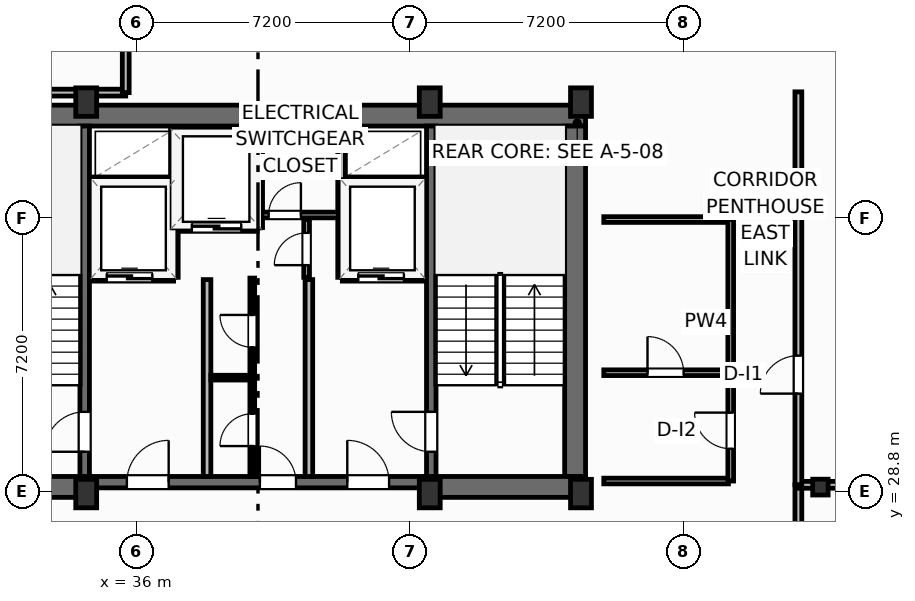
"""IFC4 building model, lengths in metres.
Left out: names, types, materials, properties, quantities, classifications, styles, units other than length and angle.
Written with IfcOpenShell. Run it as: python <this file> out.ifc"""

import sys

from ifc_helpers import new_model, si_unit, direction, frame, frame_2d, origin, origin_2d, place, context, subcontext, project, spatial, rectangle, i_section, extrude, element, fill, save


model = new_model("IFC4")
c1 = context("Model", 3, precision=1e-05, world=origin(), true_north=direction((0.0, 1.0)))
c2 = subcontext(c1, "Body", "Model", "MODEL_VIEW")
j1 = project(units=[si_unit("LENGTHUNIT", "METRE"), si_unit("PLANEANGLEUNIT", "RADIAN")], contexts=[c1])
p1 = place(None, origin())
s1 = spatial("IfcSite", under=j1, at=p1, CompositionType="ELEMENT")
p2 = place(p1, origin())
s2 = spatial("IfcBuilding", under=s1, at=p2, CompositionType="ELEMENT")
p3 = place(p2, frame((0.0, 0.0, 287.8)))
s3 = spatial("IfcBuildingStorey", under=s2, at=p3, CompositionType="ELEMENT", Elevation=287.8)
for number, where, z_axis, x_axis in (
    (1, (34.68, 28.75, 0.0), (0.0, 0.0, 1.0), (1.0, 0.0, 0.0)),
    (2, (43.72, 28.75, 0.0), (0.0, 0.0, 1.0), (1.0, 0.0, 0.0)),
    (3, (47.7, 28.75, 0.0), (0.0, 0.0, 1.0), (1.0, 0.0, 0.0)),
    (4, (34.68, 39.05, 0.0), (0.0, 0.0, 1.0), (1.0, 0.0, 0.0)),
    (5, (43.72, 39.05, 0.0), (0.0, 0.0, 1.0), (1.0, 0.0, 0.0)),
    (6, (47.7, 39.05, 0.0), (0.0, 0.0, 1.0), (1.0, 0.0, 0.0)),
):
    element("IfcColumn", number, at=place(p3, frame(where, z_axis=z_axis, x_axis=x_axis)), inside=s3, PredefinedType="COLUMN", context=c2, shape_type="SweptSolid", body=[
        extrude(rectangle(XDim=0.55, YDim=0.75, at=origin_2d()), origin(), (0.0, 0.0, 1.0), 3.7),
    ])
p4 = place(p3, frame((54.0, 28.92, 0.0), z_axis=(0.0, 0.0, 1.0), x_axis=(1.0, 0.0, 0.0)))
e7 = element("IfcColumn", 7, at=p4, inside=s3, PredefinedType="COLUMN", context=c2, shape_type="SweptSolid", body=[
    extrude(i_section(OverallWidth=0.406, OverallDepth=0.416, WebThickness=0.03, FlangeThickness=0.048, FilletRadius=0.025, at=origin_2d()), origin(), (0.0, 0.0, 1.0), 3.7),
])
p5 = place(p3, frame((30.58, 38.695, 0.0), z_axis=(0.0, 0.0, 1.0), x_axis=(1.0, 0.0, 0.0)))
e8 = element("IfcWall", 8, at=p5, inside=s3, PredefinedType="SHEAR", context=c2, shape_type="SweptSolid", body=[
    extrude(rectangle(XDim=17.24, YDim=0.55, at=frame_2d((8.62, 0.0))), origin(), (0.0, 0.0, 1.0), 3.38),
])
p6 = place(p3, frame((47.545, 29.2, 0.0), z_axis=(0.0, 0.0, 1.0), x_axis=(0.0, 1.0, 0.0)))
e9 = element("IfcWall", 9, at=p6, inside=s3, PredefinedType="SHEAR", context=c2, shape_type="SweptSolid", body=[
    extrude(rectangle(XDim=9.22, YDim=0.55, at=frame_2d((4.61, 0.0))), origin(), (0.0, 0.0, 1.0), 3.38),
])
for number, where, z_axis, x_axis in (
    (10, (30.58, 28.925, 0.0), (0.0, 0.0, 1.0), (1.0, 0.0, 0.0)),
    (11, (43.6, 28.925, 0.0), (0.0, 0.0, 1.0), (1.0, 0.0, 0.0)),
):
    element("IfcWall", number, at=place(p3, frame(where, z_axis=z_axis, x_axis=x_axis)), inside=s3, PredefinedType="SHEAR", context=c2, shape_type="SweptSolid", body=[
        extrude(rectangle(XDim=4.22, YDim=0.55, at=frame_2d((2.11, 0.0))), origin(), (0.0, 0.0, 1.0), 3.38),
    ])
p7 = place(p3, frame((34.8, 29.05, 0.0), z_axis=(0.0, 0.0, 1.0), x_axis=(1.0, 0.0, 0.0)))
e12 = element("IfcWall", 12, at=p7, inside=s3, PredefinedType="SHEAR", context=c2, shape_type="SweptSolid", body=[
    extrude(rectangle(XDim=8.8, YDim=0.3, at=frame_2d((4.4, 0.0))), origin(), (0.0, 0.0, 1.0), 3.38),
])
p8 = place(p7, frame((0.95, 0.0, 0.0)))
e13 = element("IfcOpeningElement", 13, at=p8, cuts=e12, PredefinedType="OPENING", context=c2, shape_type="SweptSolid", body=[
    extrude(rectangle(XDim=1.1, YDim=2.15, at=frame_2d((0.55, 1.075))), frame((0.0, 0.16, 0.0), z_axis=(0.0, -1.0, 0.0), x_axis=(1.0, 0.0, 0.0)), (0.0, 0.0, 1.0), 0.32),
])
p9 = place(p7, frame((6.75, 0.0, 0.0)))
e14 = element("IfcOpeningElement", 14, at=p9, cuts=e12, PredefinedType="OPENING", context=c2, shape_type="SweptSolid", body=[
    extrude(rectangle(XDim=1.1, YDim=2.15, at=frame_2d((0.55, 1.075))), frame((0.0, 0.16, 0.0), z_axis=(0.0, -1.0, 0.0), x_axis=(1.0, 0.0, 0.0)), (0.0, 0.0, 1.0), 0.32),
])
p10 = place(p7, frame((4.45, 0.0, 0.0)))
e15 = element("IfcOpeningElement", 15, at=p10, cuts=e12, PredefinedType="OPENING", context=c2, shape_type="SweptSolid", body=[
    extrude(rectangle(XDim=0.95, YDim=2.15, at=frame_2d((0.475, 1.075))), frame((0.0, 0.16, 0.0), z_axis=(0.0, -1.0, 0.0), x_axis=(1.0, 0.0, 0.0)), (0.0, 0.0, 1.0), 0.32),
])
p11 = place(p3, frame((34.64, 29.2, 0.0), z_axis=(0.0, 0.0, 1.0), x_axis=(0.0, 1.0, 0.0)))
e16 = element("IfcWall", 16, at=p11, inside=s3, PredefinedType="SHEAR", context=c2, shape_type="SweptSolid", body=[
    extrude(rectangle(XDim=9.22, YDim=0.25, at=frame_2d((4.61, 0.0))), origin(), (0.0, 0.0, 1.0), 3.38),
])
p12 = place(p11, frame((0.65, 0.0, 0.0)))
e17 = element("IfcOpeningElement", 17, at=p12, cuts=e16, PredefinedType="OPENING", context=c2, shape_type="SweptSolid", body=[
    extrude(rectangle(XDim=1.05, YDim=2.15, at=frame_2d((0.525, 1.075))), frame((0.0, 0.135, 0.0), z_axis=(0.0, -1.0, 0.0), x_axis=(1.0, 0.0, 0.0)), (0.0, 0.0, 1.0), 0.27),
])
p13 = place(p3, frame((43.76, 29.2, 0.0), z_axis=(0.0, 0.0, 1.0), x_axis=(0.0, 1.0, 0.0)))
e18 = element("IfcWall", 18, at=p13, inside=s3, PredefinedType="SHEAR", context=c2, shape_type="SweptSolid", body=[
    extrude(rectangle(XDim=9.22, YDim=0.25, at=frame_2d((4.61, 0.0))), origin(), (0.0, 0.0, 1.0), 3.38),
])
p14 = place(p13, frame((0.65, 0.0, 0.0)))
e19 = element("IfcOpeningElement", 19, at=p14, cuts=e18, PredefinedType="OPENING", context=c2, shape_type="SweptSolid", body=[
    extrude(rectangle(XDim=1.05, YDim=2.15, at=frame_2d((0.525, 1.075))), frame((0.0, 0.135, 0.0), z_axis=(0.0, -1.0, 0.0), x_axis=(1.0, 0.0, 0.0)), (0.0, 0.0, 1.0), 0.27),
])
p15 = place(p3, frame((53.42, 19.3, 0.0), z_axis=(0.0, 0.0, 1.0), x_axis=(0.0, 1.0, 0.0)))
e20 = element("IfcWall", 20, at=p15, inside=s3, PredefinedType="PARTITIONING", context=c2, shape_type="SweptSolid", body=[
    extrude(rectangle(XDim=9.68, YDim=0.18, at=frame_2d((4.84, 0.0))), origin(), (0.0, 0.0, 1.0), 3.38),
])
p16 = place(p15, frame((7.4, 0.0, 0.0)))
e21 = element("IfcOpeningElement", 21, at=p16, cuts=e20, PredefinedType="OPENING", context=c2, shape_type="SweptSolid", body=[
    extrude(rectangle(XDim=1.0, YDim=2.05, at=frame_2d((0.5, 1.025))), frame((0.0, 0.1, 0.0), z_axis=(0.0, -1.0, 0.0), x_axis=(1.0, 0.0, 0.0)), (0.0, 0.0, 1.0), 0.2),
])
p17 = place(p3, frame((53.42, 28.98, 0.0), z_axis=(0.0, 0.0, 1.0), x_axis=(1.0, 0.0, 0.0)))
e22 = element("IfcWall", 22, at=p17, inside=s3, PredefinedType="PARTITIONING", context=c2, shape_type="SweptSolid", body=[
    extrude(rectangle(XDim=16.58, YDim=0.18, at=frame_2d((8.29, 0.0))), origin(), (0.0, 0.0, 1.0), 2.592),
])
p18 = place(p3, frame((53.42, 28.98, 0.0), z_axis=(0.0, 0.0, 1.0), x_axis=(0.0, 1.0, 0.0)))
e23 = element("IfcWall", 23, at=p18, inside=s3, PredefinedType="PARTITIONING", context=c2, shape_type="SweptSolid", body=[
    extrude(rectangle(XDim=10.34, YDim=0.18, at=frame_2d((5.17, 0.0))), origin(), (0.0, 0.0, 1.0), 3.38),
])
p19 = place(p18, frame((2.4, 0.0, 0.0)))
e24 = element("IfcOpeningElement", 24, at=p19, cuts=e23, PredefinedType="OPENING", context=c2, shape_type="SweptSolid", body=[
    extrude(rectangle(XDim=1.0, YDim=2.05, at=frame_2d((0.5, 1.025))), frame((0.0, 0.1, 0.0), z_axis=(0.0, -1.0, 0.0), x_axis=(1.0, 0.0, 0.0)), (0.0, 0.0, 1.0), 0.2),
])
p20 = place(p3, frame((27.159, 39.3, 0.0), z_axis=(0.0, 0.0, 1.0), x_axis=(1.0, 0.0, 0.0)))
e25 = element("IfcWall", 25, at=p20, inside=s3, PredefinedType="PARTITIONING", context=c2, shape_type="SweptSolid", body=[
    extrude(rectangle(XDim=8.561, YDim=0.18, at=frame_2d((4.281, 0.0))), origin(), (0.0, 0.0, 1.0), 3.38),
])
p21 = place(p3, frame((35.72, 39.3, 0.0), z_axis=(0.0, 0.0, 1.0), x_axis=(0.0, 1.0, 0.0)))
e26 = element("IfcWall", 26, at=p21, inside=s3, PredefinedType="PARTITIONING", context=c2, shape_type="SweptSolid", body=[
    extrude(rectangle(XDim=2.12, YDim=0.18, at=frame_2d((1.06, 0.0))), origin(), (0.0, 0.0, 1.0), 3.38),
])
for number, where, z_axis, x_axis in (
    (27, (37.86, 29.2, 0.0), (0.0, 0.0, 1.0), (0.0, 1.0, 0.0)),
    (28, (40.54, 29.2, 0.0), (0.0, 0.0, 1.0), (0.0, 1.0, 0.0)),
):
    element("IfcWall", number, at=place(p3, frame(where, z_axis=z_axis, x_axis=x_axis)), inside=s3, PredefinedType="PARTITIONING", context=c2, shape_type="SweptSolid", body=[
        extrude(rectangle(XDim=5.18, YDim=0.2, at=frame_2d((2.59, 0.0))), origin(), (0.0, 0.0, 1.0), 3.38),
    ])
p22 = place(p3, frame((34.8, 34.44, 0.0), z_axis=(0.0, 0.0, 1.0), x_axis=(1.0, 0.0, 0.0)))
e29 = element("IfcWall", 29, at=p22, inside=s3, PredefinedType="PARTITIONING", context=c2, shape_type="SweptSolid", body=[
    extrude(rectangle(XDim=2.18, YDim=0.2, at=frame_2d((1.09, 0.0))), origin(), (0.0, 0.0, 1.0), 3.38),
])
p23 = place(p22, frame((0.42, 0.0, 0.0)))
e30 = element("IfcOpeningElement", 30, at=p23, cuts=e29, PredefinedType="OPENING", context=c2, shape_type="SweptSolid", body=[
    extrude(rectangle(XDim=1.2, YDim=2.2, at=frame_2d((0.6, 1.1))), frame((0.0, 0.11, 0.0), z_axis=(0.0, -1.0, 0.0), x_axis=(1.0, 0.0, 0.0)), (0.0, 0.0, 1.0), 0.22),
])
p24 = place(p3, frame((34.8, 36.98, 0.0), z_axis=(0.0, 0.0, 1.0), x_axis=(1.0, 0.0, 0.0)))
e31 = element("IfcWall", 31, at=p24, inside=s3, PredefinedType="PARTITIONING", context=c2, shape_type="SweptSolid", body=[
    extrude(rectangle(XDim=2.18, YDim=0.2, at=frame_2d((1.09, 0.0))), origin(), (0.0, 0.0, 1.0), 3.38),
])
p25 = place(p3, frame((37.0, 34.44, 0.0), z_axis=(0.0, 0.0, 1.0), x_axis=(0.0, 1.0, 0.0)))
e32 = element("IfcWall", 32, at=p25, inside=s3, PredefinedType="PARTITIONING", context=c2, shape_type="SweptSolid", body=[
    extrude(rectangle(XDim=3.9, YDim=0.2, at=frame_2d((1.95, 0.0))), origin(), (0.0, 0.0, 1.0), 3.38),
])
p26 = place(p3, frame((41.42, 34.44, 0.0), z_axis=(0.0, 0.0, 1.0), x_axis=(1.0, 0.0, 0.0)))
e33 = element("IfcWall", 33, at=p26, inside=s3, PredefinedType="PARTITIONING", context=c2, shape_type="SweptSolid", body=[
    extrude(rectangle(XDim=2.18, YDim=0.2, at=frame_2d((1.09, 0.0))), origin(), (0.0, 0.0, 1.0), 3.38),
])
p27 = place(p26, frame((0.42, 0.0, 0.0)))
e34 = element("IfcOpeningElement", 34, at=p27, cuts=e33, PredefinedType="OPENING", context=c2, shape_type="SweptSolid", body=[
    extrude(rectangle(XDim=1.2, YDim=2.2, at=frame_2d((0.6, 1.1))), frame((0.0, 0.11, 0.0), z_axis=(0.0, -1.0, 0.0), x_axis=(1.0, 0.0, 0.0)), (0.0, 0.0, 1.0), 0.22),
])
p28 = place(p3, frame((41.42, 36.98, 0.0), z_axis=(0.0, 0.0, 1.0), x_axis=(1.0, 0.0, 0.0)))
e35 = element("IfcWall", 35, at=p28, inside=s3, PredefinedType="PARTITIONING", context=c2, shape_type="SweptSolid", body=[
    extrude(rectangle(XDim=2.18, YDim=0.2, at=frame_2d((1.09, 0.0))), origin(), (0.0, 0.0, 1.0), 3.38),
])
p29 = place(p3, frame((41.4, 34.44, 0.0), z_axis=(0.0, 0.0, 1.0), x_axis=(0.0, 1.0, 0.0)))
e36 = element("IfcWall", 36, at=p29, inside=s3, PredefinedType="PARTITIONING", context=c2, shape_type="SweptSolid", body=[
    extrude(rectangle(XDim=3.9, YDim=0.2, at=frame_2d((1.95, 0.0))), origin(), (0.0, 0.0, 1.0), 3.38),
])
p30 = place(p3, frame((37.06, 35.75, 0.0), z_axis=(0.0, 0.0, 1.0), x_axis=(1.0, 0.0, 0.0)))
e37 = element("IfcWall", 37, at=p30, inside=s3, PredefinedType="PARTITIONING", context=c2, shape_type="SweptSolid", body=[
    extrude(rectangle(XDim=2.12, YDim=0.2, at=frame_2d((1.06, 0.0))), origin(), (0.0, 0.0, 1.0), 3.38),
])
p31 = place(p30, frame((0.4, 0.0, 0.0)))
e38 = element("IfcOpeningElement", 38, at=p31, cuts=e37, PredefinedType="OPENING", context=c2, shape_type="SweptSolid", body=[
    extrude(rectangle(XDim=1.3, YDim=2.2, at=frame_2d((0.65, 1.1))), frame((0.0, 0.11, 0.0), z_axis=(0.0, -1.0, 0.0), x_axis=(1.0, 0.0, 0.0)), (0.0, 0.0, 1.0), 0.22),
])
p32 = place(p3, frame((39.22, 35.75, 0.0), z_axis=(0.0, 0.0, 1.0), x_axis=(0.0, 1.0, 0.0)))
e39 = element("IfcWall", 39, at=p32, inside=s3, PredefinedType="PARTITIONING", context=c2, shape_type="SweptSolid", body=[
    extrude(rectangle(XDim=2.59, YDim=0.2, at=frame_2d((1.295, 0.0))), origin(), (0.0, 0.0, 1.0), 3.38),
])
p33 = place(p3, frame((39.3, 36.08, 0.0), z_axis=(0.0, 0.0, 1.0), x_axis=(1.0, 0.0, 0.0)))
e40 = element("IfcWall", 40, at=p33, inside=s3, PredefinedType="PARTITIONING", context=c2, shape_type="SweptSolid", body=[
    extrude(rectangle(XDim=2.02, YDim=0.15, at=frame_2d((1.01, 0.0))), origin(), (0.0, 0.0, 1.0), 3.38),
])
p34 = place(p33, frame((0.18, 0.0, 0.0)))
e41 = element("IfcOpeningElement", 41, at=p34, cuts=e40, PredefinedType="OPENING", context=c2, shape_type="SweptSolid", body=[
    extrude(rectangle(XDim=0.85, YDim=2.05, at=frame_2d((0.425, 1.025))), frame((0.0, 0.085, 0.0), z_axis=(0.0, -1.0, 0.0), x_axis=(1.0, 0.0, 0.0)), (0.0, 0.0, 1.0), 0.17),
])
p35 = place(p3, frame((40.48, 34.44, 0.0), z_axis=(0.0, 0.0, 1.0), x_axis=(0.0, 1.0, 0.0)))
e42 = element("IfcWall", 42, at=p35, inside=s3, PredefinedType="PARTITIONING", context=c2, shape_type="SweptSolid", body=[
    extrude(rectangle(XDim=1.52, YDim=0.15, at=frame_2d((0.76, 0.0))), origin(), (0.0, 0.0, 1.0), 3.38),
])
p36 = place(p35, frame((0.32, 0.0, 0.0)))
e43 = element("IfcOpeningElement", 43, at=p36, cuts=e42, PredefinedType="OPENING", context=c2, shape_type="SweptSolid", body=[
    extrude(rectangle(XDim=0.85, YDim=2.05, at=frame_2d((0.425, 1.025))), frame((0.0, 0.085, 0.0), z_axis=(0.0, -1.0, 0.0), x_axis=(1.0, 0.0, 0.0)), (0.0, 0.0, 1.0), 0.17),
])
p37 = place(p3, frame((37.96, 31.8, 0.0), z_axis=(0.0, 0.0, 1.0), x_axis=(1.0, 0.0, 0.0)))
e44 = element("IfcWall", 44, at=p37, inside=s3, PredefinedType="PARTITIONING", context=c2, shape_type="SweptSolid", body=[
    extrude(rectangle(XDim=1.09, YDim=0.125, at=frame_2d((0.545, 0.0))), origin(), (0.0, 0.0, 1.0), 3.38),
])
p38 = place(p3, frame((39.05, 29.2, 0.0), z_axis=(0.0, 0.0, 1.0), x_axis=(0.0, 1.0, 0.0)))
e45 = element("IfcWall", 45, at=p38, inside=s3, PredefinedType="PARTITIONING", context=c2, shape_type="SweptSolid", body=[
    extrude(rectangle(XDim=5.22, YDim=0.125, at=frame_2d((2.61, 0.0))), origin(), (0.0, 0.0, 1.0), 3.38),
])
p39 = place(p38, frame((0.8, 0.0, 0.0)))
e46 = element("IfcOpeningElement", 46, at=p39, cuts=e45, PredefinedType="OPENING", context=c2, shape_type="SweptSolid", body=[
    extrude(rectangle(XDim=0.85, YDim=2.05, at=frame_2d((0.425, 1.025))), frame((0.0, 0.073, 0.0), z_axis=(0.0, -1.0, 0.0), x_axis=(1.0, 0.0, 0.0)), (0.0, 0.0, 1.0), 0.145),
])
p40 = place(p38, frame((3.4, 0.0, 0.0)))
e47 = element("IfcOpeningElement", 47, at=p40, cuts=e45, PredefinedType="OPENING", context=c2, shape_type="SweptSolid", body=[
    extrude(rectangle(XDim=0.85, YDim=2.05, at=frame_2d((0.425, 1.025))), frame((0.0, 0.073, 0.0), z_axis=(0.0, -1.0, 0.0), x_axis=(1.0, 0.0, 0.0)), (0.0, 0.0, 1.0), 0.145),
])
p41 = place(p3, frame((48.3, 31.93, 0.0), z_axis=(0.0, 0.0, 1.0), x_axis=(1.0, 0.0, 0.0)))
e48 = element("IfcWall", 48, at=p41, inside=s3, PredefinedType="PARTITIONING", context=c2, shape_type="SweptSolid", body=[
    extrude(rectangle(XDim=3.28, YDim=0.15, at=frame_2d((1.64, 0.0))), origin(), (0.0, 0.0, 1.0), 3.38),
])
p42 = place(p41, frame((1.15, 0.0, 0.0)))
e49 = element("IfcOpeningElement", 49, at=p42, cuts=e48, PredefinedType="OPENING", context=c2, shape_type="SweptSolid", body=[
    extrude(rectangle(XDim=0.95, YDim=2.05, at=frame_2d((0.475, 1.025))), frame((0.0, 0.085, 0.0), z_axis=(0.0, -1.0, 0.0), x_axis=(1.0, 0.0, 0.0)), (0.0, 0.0, 1.0), 0.17),
])
p43 = place(p3, frame((48.3, 29.08, 0.0), z_axis=(0.0, 0.0, 1.0), x_axis=(1.0, 0.0, 0.0)))
e50 = element("IfcWall", 50, at=p43, inside=s3, PredefinedType="PARTITIONING", context=c2, shape_type="SweptSolid", body=[
    extrude(rectangle(XDim=3.28, YDim=0.15, at=frame_2d((1.64, 0.0))), origin(), (0.0, 0.0, 1.0), 2.592),
])
p44 = place(p3, frame((48.3, 35.96, 0.0), z_axis=(0.0, 0.0, 1.0), x_axis=(1.0, 0.0, 0.0)))
e51 = element("IfcWall", 51, at=p44, inside=s3, PredefinedType="PARTITIONING", context=c2, shape_type="SweptSolid", body=[
    extrude(rectangle(XDim=3.28, YDim=0.15, at=frame_2d((1.64, 0.0))), origin(), (0.0, 0.0, 1.0), 3.38),
])
p45 = place(p3, frame((51.64, 29.08, 0.0), z_axis=(0.0, 0.0, 1.0), x_axis=(0.0, 1.0, 0.0)))
e52 = element("IfcWall", 52, at=p45, inside=s3, PredefinedType="PARTITIONING", context=c2, shape_type="SweptSolid", body=[
    extrude(rectangle(XDim=6.88, YDim=0.15, at=frame_2d((3.44, 0.0))), origin(), (0.0, 0.0, 1.0), 3.38),
])
p46 = place(p45, frame((0.85, 0.0, 0.0)))
e53 = element("IfcOpeningElement", 53, at=p46, cuts=e52, PredefinedType="OPENING", context=c2, shape_type="SweptSolid", body=[
    extrude(rectangle(XDim=0.95, YDim=2.05, at=frame_2d((0.475, 1.025))), frame((0.0, 0.085, 0.0), z_axis=(0.0, -1.0, 0.0), x_axis=(1.0, 0.0, 0.0)), (0.0, 0.0, 1.0), 0.17),
])
p47 = place(p19, origin())
e54 = element("IfcDoor", 54, at=p47, inside=s3, OperationType="SINGLE_SWING_LEFT", PredefinedType="DOOR", context=c2, shape_type="SweptSolid", body=[
    extrude(rectangle(XDim=1.0, YDim=2.05, at=frame_2d((0.5, 1.025))), frame((0.0, 0.025, 0.0), z_axis=(0.0, -1.0, 0.0), x_axis=(1.0, 0.0, 0.0)), (0.0, 0.0, 1.0), 0.05),
])
fill(e24, e54)
p48 = place(p12, origin())
e55 = element("IfcDoor", 55, at=p48, inside=s3, OperationType="SINGLE_SWING_LEFT", PredefinedType="DOOR", context=c2, shape_type="SweptSolid", body=[
    extrude(rectangle(XDim=1.05, YDim=2.15, at=frame_2d((0.525, 1.075))), frame((0.0, 0.025, 0.0), z_axis=(0.0, -1.0, 0.0), x_axis=(1.0, 0.0, 0.0)), (0.0, 0.0, 1.0), 0.05),
])
fill(e17, e55)
p49 = place(p14, origin())
e56 = element("IfcDoor", 56, at=p49, inside=s3, OperationType="SINGLE_SWING_RIGHT", PredefinedType="DOOR", context=c2, shape_type="SweptSolid", body=[
    extrude(rectangle(XDim=1.05, YDim=2.15, at=frame_2d((0.525, 1.075))), frame((0.0, 0.025, 0.0), z_axis=(0.0, -1.0, 0.0), x_axis=(1.0, 0.0, 0.0)), (0.0, 0.0, 1.0), 0.05),
])
fill(e19, e56)
p50 = place(p8, origin())
e57 = element("IfcDoor", 57, at=p50, inside=s3, OperationType="SINGLE_SWING_RIGHT", PredefinedType="DOOR", context=c2, shape_type="SweptSolid", body=[
    extrude(rectangle(XDim=1.1, YDim=2.15, at=frame_2d((0.55, 1.075))), frame((0.0, 0.025, 0.0), z_axis=(0.0, -1.0, 0.0), x_axis=(1.0, 0.0, 0.0)), (0.0, 0.0, 1.0), 0.05),
])
fill(e13, e57)
p51 = place(p9, origin())
e58 = element("IfcDoor", 58, at=p51, inside=s3, OperationType="SINGLE_SWING_LEFT", PredefinedType="DOOR", context=c2, shape_type="SweptSolid", body=[
    extrude(rectangle(XDim=1.1, YDim=2.15, at=frame_2d((0.55, 1.075))), frame((0.0, 0.025, 0.0), z_axis=(0.0, -1.0, 0.0), x_axis=(1.0, 0.0, 0.0)), (0.0, 0.0, 1.0), 0.05),
])
fill(e14, e58)
p52 = place(p23, origin())
e59 = element("IfcDoor", 59, at=p52, inside=s3, OperationType="SLIDING_TO_LEFT", PredefinedType="DOOR", context=c2, shape_type="SweptSolid", body=[
    extrude(rectangle(XDim=1.2, YDim=2.2, at=frame_2d((0.6, 1.1))), frame((0.0, 0.025, 0.0), z_axis=(0.0, -1.0, 0.0), x_axis=(1.0, 0.0, 0.0)), (0.0, 0.0, 1.0), 0.05),
])
fill(e30, e59)
p53 = place(p27, origin())
e60 = element("IfcDoor", 60, at=p53, inside=s3, OperationType="SLIDING_TO_LEFT", PredefinedType="DOOR", context=c2, shape_type="SweptSolid", body=[
    extrude(rectangle(XDim=1.2, YDim=2.2, at=frame_2d((0.6, 1.1))), frame((0.0, 0.025, 0.0), z_axis=(0.0, -1.0, 0.0), x_axis=(1.0, 0.0, 0.0)), (0.0, 0.0, 1.0), 0.05),
])
fill(e34, e60)
p54 = place(p31, origin())
e61 = element("IfcDoor", 61, at=p54, inside=s3, OperationType="SLIDING_TO_LEFT", PredefinedType="DOOR", context=c2, shape_type="SweptSolid", body=[
    extrude(rectangle(XDim=1.3, YDim=2.2, at=frame_2d((0.65, 1.1))), frame((0.0, 0.025, 0.0), z_axis=(0.0, -1.0, 0.0), x_axis=(1.0, 0.0, 0.0)), (0.0, 0.0, 1.0), 0.05),
])
fill(e38, e61)
p55 = place(p34, origin())
e62 = element("IfcDoor", 62, at=p55, inside=s3, OperationType="SINGLE_SWING_RIGHT", PredefinedType="DOOR", context=c2, shape_type="SweptSolid", body=[
    extrude(rectangle(XDim=0.85, YDim=2.05, at=frame_2d((0.425, 1.025))), frame((0.0, 0.025, 0.0), z_axis=(0.0, -1.0, 0.0), x_axis=(1.0, 0.0, 0.0)), (0.0, 0.0, 1.0), 0.05),
])
fill(e41, e62)
p56 = place(p36, origin())
e63 = element("IfcDoor", 63, at=p56, inside=s3, OperationType="SINGLE_SWING_LEFT", PredefinedType="DOOR", context=c2, shape_type="SweptSolid", body=[
    extrude(rectangle(XDim=0.85, YDim=2.05, at=frame_2d((0.425, 1.025))), frame((0.0, 0.025, 0.0), z_axis=(0.0, -1.0, 0.0), x_axis=(1.0, 0.0, 0.0)), (0.0, 0.0, 1.0), 0.05),
])
fill(e43, e63)
p57 = place(p39, origin())
e64 = element("IfcDoor", 64, at=p57, inside=s3, OperationType="SINGLE_SWING_LEFT", PredefinedType="DOOR", context=c2, shape_type="SweptSolid", body=[
    extrude(rectangle(XDim=0.85, YDim=2.05, at=frame_2d((0.425, 1.025))), frame((0.0, 0.025, 0.0), z_axis=(0.0, -1.0, 0.0), x_axis=(1.0, 0.0, 0.0)), (0.0, 0.0, 1.0), 0.05),
])
fill(e46, e64)
p58 = place(p40, origin())
e65 = element("IfcDoor", 65, at=p58, inside=s3, OperationType="SINGLE_SWING_RIGHT", PredefinedType="DOOR", context=c2, shape_type="SweptSolid", body=[
    extrude(rectangle(XDim=0.85, YDim=2.05, at=frame_2d((0.425, 1.025))), frame((0.0, 0.025, 0.0), z_axis=(0.0, -1.0, 0.0), x_axis=(1.0, 0.0, 0.0)), (0.0, 0.0, 1.0), 0.05),
])
fill(e47, e65)
p59 = place(p10, origin())
e66 = element("IfcDoor", 66, at=p59, inside=s3, OperationType="SINGLE_SWING_LEFT", PredefinedType="DOOR", context=c2, shape_type="SweptSolid", body=[
    extrude(rectangle(XDim=0.95, YDim=2.15, at=frame_2d((0.475, 1.075))), frame((0.0, 0.025, 0.0), z_axis=(0.0, -1.0, 0.0), x_axis=(1.0, 0.0, 0.0)), (0.0, 0.0, 1.0), 0.05),
])
fill(e15, e66)
p60 = place(p42, origin())
e67 = element("IfcDoor", 67, at=p60, inside=s3, OperationType="SINGLE_SWING_LEFT", PredefinedType="DOOR", context=c2, shape_type="SweptSolid", body=[
    extrude(rectangle(XDim=0.95, YDim=2.05, at=frame_2d((0.475, 1.025))), frame((0.0, 0.025, 0.0), z_axis=(0.0, -1.0, 0.0), x_axis=(1.0, 0.0, 0.0)), (0.0, 0.0, 1.0), 0.05),
])
fill(e49, e67)
p61 = place(p46, origin())
e68 = element("IfcDoor", 68, at=p61, inside=s3, OperationType="SINGLE_SWING_RIGHT", PredefinedType="DOOR", context=c2, shape_type="SweptSolid", body=[
    extrude(rectangle(XDim=0.95, YDim=2.05, at=frame_2d((0.475, 1.025))), frame((0.0, 0.025, 0.0), z_axis=(0.0, -1.0, 0.0), x_axis=(1.0, 0.0, 0.0)), (0.0, 0.0, 1.0), 0.05),
])
fill(e53, e68)
save(model, sys.argv[1])
